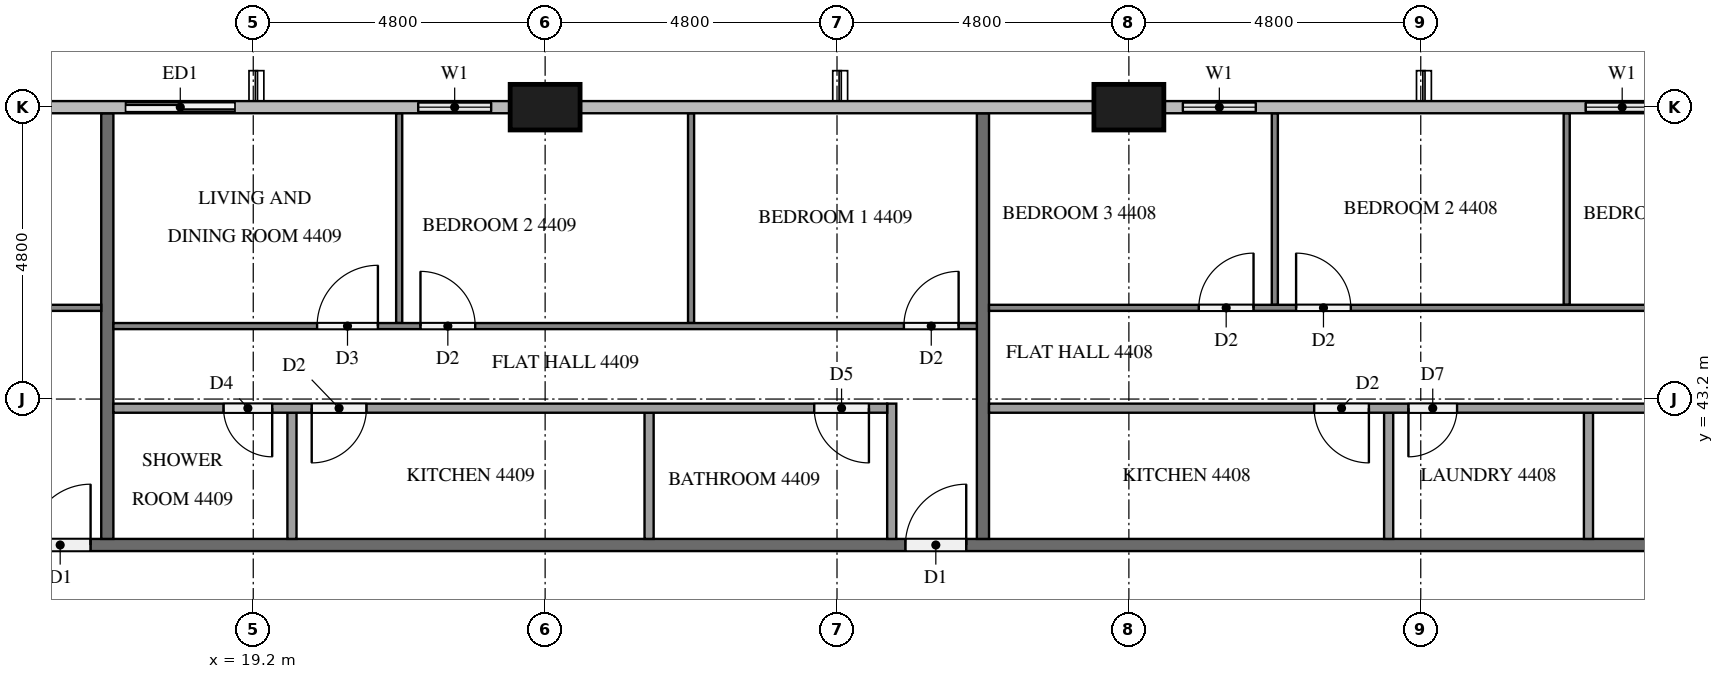
"""IFC4 building model, lengths in metres.
Left out: names, types, materials, properties, quantities, classifications, styles, units other than length and angle.
Written with IfcOpenShell. Run it as: python <this file> out.ifc"""

import sys

from ifc_helpers import new_model, si_unit, direction, frame, frame_2d, origin, origin_2d, place, context, subcontext, project, spatial, rectangle, extrude, element, fill, save


model = new_model("IFC4")
c1 = context("Model", 3, precision=1e-05, world=origin(), true_north=direction((0.0, 1.0)))
c2 = subcontext(c1, "Body", "Model", "MODEL_VIEW")
j1 = project(units=[si_unit("LENGTHUNIT", "METRE"), si_unit("PLANEANGLEUNIT", "RADIAN")], contexts=[c1])
p1 = place(None, origin())
s1 = spatial("IfcSite", under=j1, at=p1, CompositionType="ELEMENT")
p2 = place(p1, origin())
s2 = spatial("IfcBuilding", under=s1, at=p2, CompositionType="ELEMENT")
p3 = place(p2, frame((0.0, 0.0, 170.0)))
s3 = spatial("IfcBuildingStorey", under=s2, at=p3, CompositionType="ELEMENT", Elevation=170.0)
for number, where, z_axis, x_axis in (
    (1, (33.6, 48.0, 0.0), (0.0, 0.0, 1.0), (1.0, 0.0, 0.0)),
    (2, (24.0, 48.0, 0.0), (0.0, 0.0, 1.0), (1.0, 0.0, 0.0)),
):
    element("IfcColumn", number, at=place(p3, frame(where, z_axis=z_axis, x_axis=x_axis)), inside=s3, PredefinedType="COLUMN", context=c2, shape_type="SweptSolid", body=[
        extrude(rectangle(XDim=1.15, YDim=0.75, at=origin_2d()), origin(), (0.0, 0.0, 1.0), 3.1),
    ])
p4 = place(p3, frame((42.625, 48.0, 0.0), z_axis=(0.0, 0.0, 1.0), x_axis=(-1.0, 0.0, 0.0)))
e3 = element("IfcWall", 3, at=p4, inside=s3, PredefinedType="SOLIDWALL", context=c2, shape_type="SweptSolid", body=[
    extrude(rectangle(XDim=1.825, YDim=0.15, at=frame_2d((0.913, 0.0))), origin(), (0.0, 0.0, 1.0), 3.1),
])
p5 = place(p4, frame((0.312, 0.0, 0.9)))
e4 = element("IfcOpeningElement", 4, at=p5, cuts=e3, PredefinedType="OPENING", context=c2, shape_type="SweptSolid", body=[
    extrude(rectangle(XDim=1.2, YDim=1.4, at=frame_2d((0.6, 0.7))), frame((0.0, 0.085, 0.0), z_axis=(0.0, -1.0, 0.0), x_axis=(1.0, 0.0, 0.0)), (0.0, 0.0, 1.0), 0.17),
])
p6 = place(p3, frame((36.0, 48.0, 0.0), z_axis=(0.0, 0.0, 1.0), x_axis=(-1.0, 0.0, 0.0)))
e5 = element("IfcWall", 5, at=p6, inside=s3, PredefinedType="SOLIDWALL", context=c2, shape_type="SweptSolid", body=[
    extrude(rectangle(XDim=1.825, YDim=0.15, at=frame_2d((0.913, 0.0))), origin(), (0.0, 0.0, 1.0), 3.1),
])
p7 = place(p6, frame((0.312, 0.0, 0.9)))
e6 = element("IfcOpeningElement", 6, at=p7, cuts=e5, PredefinedType="OPENING", context=c2, shape_type="SweptSolid", body=[
    extrude(rectangle(XDim=1.2, YDim=1.4, at=frame_2d((0.6, 0.7))), frame((0.0, 0.085, 0.0), z_axis=(0.0, -1.0, 0.0), x_axis=(1.0, 0.0, 0.0)), (0.0, 0.0, 1.0), 0.17),
])
p8 = place(p3, frame((23.425, 48.0, 0.0), z_axis=(0.0, 0.0, 1.0), x_axis=(-1.0, 0.0, 0.0)))
e7 = element("IfcWall", 7, at=p8, inside=s3, PredefinedType="SOLIDWALL", context=c2, shape_type="SweptSolid", body=[
    extrude(rectangle(XDim=1.825, YDim=0.15, at=frame_2d((0.913, 0.0))), origin(), (0.0, 0.0, 1.0), 3.1),
])
p9 = place(p8, frame((0.312, 0.0, 0.9)))
e8 = element("IfcOpeningElement", 8, at=p9, cuts=e7, PredefinedType="OPENING", context=c2, shape_type="SweptSolid", body=[
    extrude(rectangle(XDim=1.2, YDim=1.4, at=frame_2d((0.6, 0.7))), frame((0.0, 0.085, 0.0), z_axis=(0.0, -1.0, 0.0), x_axis=(1.0, 0.0, 0.0)), (0.0, 0.0, 1.0), 0.17),
])
p10 = place(p3, frame((19.2, 48.0, 0.0), z_axis=(0.0, 0.0, 1.0), x_axis=(-1.0, 0.0, 0.0)))
e9 = element("IfcWall", 9, at=p10, inside=s3, PredefinedType="SOLIDWALL", context=c2, shape_type="SweptSolid", body=[
    extrude(rectangle(XDim=2.4, YDim=0.15, at=frame_2d((1.2, 0.0))), origin(), (0.0, 0.0, 1.0), 3.1),
])
p11 = place(p10, frame((0.3, 0.0, 0.0)))
e10 = element("IfcOpeningElement", 10, at=p11, cuts=e9, PredefinedType="OPENING", context=c2, shape_type="SweptSolid", body=[
    extrude(rectangle(XDim=1.8, YDim=2.4, at=frame_2d((0.9, 1.2))), frame((0.0, 0.085, 0.0), z_axis=(0.0, -1.0, 0.0), x_axis=(1.0, 0.0, 0.0)), (0.0, 0.0, 1.0), 0.17),
])
p12 = place(p3, frame((11.9, 40.8, 0.0), z_axis=(0.0, 0.0, 1.0), x_axis=(1.0, 0.0, 0.0)))
e11 = element("IfcWall", 11, at=p12, inside=s3, PredefinedType="PARTITIONING", context=c2, shape_type="SweptSolid", body=[
    extrude(rectangle(XDim=38.6, YDim=0.2, at=frame_2d((19.3, 0.0))), origin(), (0.0, 0.0, 1.0), 3.1),
])
p13 = place(p12, frame((37.175, 0.0, 0.0)))
e12 = element("IfcOpeningElement", 12, at=p13, cuts=e11, PredefinedType="OPENING", context=c2, shape_type="SweptSolid", body=[
    extrude(rectangle(XDim=1.1, YDim=2.1, at=frame_2d((0.55, 1.05))), frame((0.0, 0.11, 0.0), z_axis=(0.0, -1.0, 0.0), x_axis=(1.0, 0.0, 0.0)), (0.0, 0.0, 1.0), 0.22),
])
p14 = place(p12, frame((18.025, 0.0, 0.0)))
e13 = element("IfcOpeningElement", 13, at=p14, cuts=e11, PredefinedType="OPENING", context=c2, shape_type="SweptSolid", body=[
    extrude(rectangle(XDim=1.0, YDim=2.1, at=frame_2d((0.5, 1.05))), frame((0.0, 0.11, 0.0), z_axis=(0.0, -1.0, 0.0), x_axis=(1.0, 0.0, 0.0)), (0.0, 0.0, 1.0), 0.22),
])
p15 = place(p12, frame((3.625, 0.0, 0.0)))
e14 = element("IfcOpeningElement", 14, at=p15, cuts=e11, PredefinedType="OPENING", context=c2, shape_type="SweptSolid", body=[
    extrude(rectangle(XDim=1.0, YDim=2.1, at=frame_2d((0.5, 1.05))), frame((0.0, 0.11, 0.0), z_axis=(0.0, -1.0, 0.0), x_axis=(1.0, 0.0, 0.0)), (0.0, 0.0, 1.0), 0.22),
])
for number, where, z_axis, x_axis in (
    (15, (31.2, 47.9, 0.0), (0.0, 0.0, 1.0), (0.0, -1.0, 0.0)),
    (16, (16.8, 47.9, 0.0), (0.0, 0.0, 1.0), (0.0, -1.0, 0.0)),
):
    element("IfcWall", number, at=place(p3, frame(where, z_axis=z_axis, x_axis=x_axis)), inside=s3, PredefinedType="PARTITIONING", context=c2, shape_type="SweptSolid", body=[
        extrude(rectangle(XDim=7.0, YDim=0.2, at=frame_2d((3.5, 0.0))), origin(), (0.0, 0.0, 1.0), 3.1),
    ])
for number, where, z_axis, x_axis in (
    (17, (40.8, 44.75, 0.0), (0.0, 0.0, 1.0), (0.0, 1.0, 0.0)),
    (18, (36.0, 44.75, 0.0), (0.0, 0.0, 1.0), (0.0, 1.0, 0.0)),
):
    element("IfcWall", number, at=place(p3, frame(where, z_axis=z_axis, x_axis=x_axis)), inside=s3, PredefinedType="PARTITIONING", context=c2, shape_type="SweptSolid", body=[
        extrude(rectangle(XDim=3.15, YDim=0.1, at=frame_2d((1.575, 0.0))), origin(), (0.0, 0.0, 1.0), 3.1),
    ])
p16 = place(p3, frame((31.3, 44.7, 0.0), z_axis=(0.0, 0.0, 1.0), x_axis=(1.0, 0.0, 0.0)))
e19 = element("IfcWall", 19, at=p16, inside=s3, PredefinedType="PARTITIONING", context=c2, shape_type="SweptSolid", body=[
    extrude(rectangle(XDim=19.0, YDim=0.1, at=frame_2d((9.5, 0.0))), origin(), (0.0, 0.0, 1.0), 3.1),
])
p17 = place(p16, frame((14.65, 0.0, 0.0)))
e20 = element("IfcOpeningElement", 20, at=p17, cuts=e19, PredefinedType="OPENING", context=c2, shape_type="SweptSolid", body=[
    extrude(rectangle(XDim=1.0, YDim=2.1, at=frame_2d((0.5, 1.05))), frame((0.0, 0.06, 0.0), z_axis=(0.0, -1.0, 0.0), x_axis=(1.0, 0.0, 0.0)), (0.0, 0.0, 1.0), 0.12),
])
p18 = place(p16, frame((13.05, 0.0, 0.0)))
e21 = element("IfcOpeningElement", 21, at=p18, cuts=e19, PredefinedType="OPENING", context=c2, shape_type="SweptSolid", body=[
    extrude(rectangle(XDim=0.9, YDim=2.1, at=frame_2d((0.45, 1.05))), frame((0.0, 0.06, 0.0), z_axis=(0.0, -1.0, 0.0), x_axis=(1.0, 0.0, 0.0)), (0.0, 0.0, 1.0), 0.12),
])
p19 = place(p16, frame((5.05, 0.0, 0.0)))
e22 = element("IfcOpeningElement", 22, at=p19, cuts=e19, PredefinedType="OPENING", context=c2, shape_type="SweptSolid", body=[
    extrude(rectangle(XDim=0.9, YDim=2.1, at=frame_2d((0.45, 1.05))), frame((0.0, 0.06, 0.0), z_axis=(0.0, -1.0, 0.0), x_axis=(1.0, 0.0, 0.0)), (0.0, 0.0, 1.0), 0.12),
])
p20 = place(p16, frame((3.45, 0.0, 0.0)))
e23 = element("IfcOpeningElement", 23, at=p20, cuts=e19, PredefinedType="OPENING", context=c2, shape_type="SweptSolid", body=[
    extrude(rectangle(XDim=0.9, YDim=2.1, at=frame_2d((0.45, 1.05))), frame((0.0, 0.06, 0.0), z_axis=(0.0, -1.0, 0.0), x_axis=(1.0, 0.0, 0.0)), (0.0, 0.0, 1.0), 0.12),
])
for number, where, z_axis, x_axis in (
    (24, (41.158, 40.9, 0.0), (0.0, 0.0, 1.0), (0.0, 1.0, 0.0)),
    (25, (37.872, 40.9, 0.0), (0.0, 0.0, 1.0), (0.0, 1.0, 0.0)),
):
    element("IfcWall", number, at=place(p3, frame(where, z_axis=z_axis, x_axis=x_axis)), inside=s3, PredefinedType="PARTITIONING", context=c2, shape_type="SweptSolid", body=[
        extrude(rectangle(XDim=2.075, YDim=0.15, at=frame_2d((1.038, 0.0))), origin(), (0.0, 0.0, 1.0), 3.1),
    ])
p21 = place(p3, frame((48.825, 43.05, 0.0), z_axis=(0.0, 0.0, 1.0), x_axis=(-1.0, 0.0, 0.0)))
e26 = element("IfcWall", 26, at=p21, inside=s3, PredefinedType="PARTITIONING", context=c2, shape_type="SweptSolid", body=[
    extrude(rectangle(XDim=17.525, YDim=0.15, at=frame_2d((8.762, 0.0))), origin(), (0.0, 0.0, 1.0), 3.1),
])
p22 = place(p21, frame((2.161, 0.0, 0.0)))
e27 = element("IfcOpeningElement", 27, at=p22, cuts=e26, PredefinedType="OPENING", context=c2, shape_type="SweptSolid", body=[
    extrude(rectangle(XDim=0.8, YDim=2.1, at=frame_2d((0.4, 1.05))), frame((0.0, 0.085, 0.0), z_axis=(0.0, -1.0, 0.0), x_axis=(1.0, 0.0, 0.0)), (0.0, 0.0, 1.0), 0.17),
])
p23 = place(p21, frame((3.611, 0.0, 0.0)))
e28 = element("IfcOpeningElement", 28, at=p23, cuts=e26, PredefinedType="OPENING", context=c2, shape_type="SweptSolid", body=[
    extrude(rectangle(XDim=0.9, YDim=2.1, at=frame_2d((0.45, 1.05))), frame((0.0, 0.085, 0.0), z_axis=(0.0, -1.0, 0.0), x_axis=(1.0, 0.0, 0.0)), (0.0, 0.0, 1.0), 0.17),
])
p24 = place(p21, frame((9.828, 0.0, 0.0)))
e29 = element("IfcOpeningElement", 29, at=p24, cuts=e26, PredefinedType="OPENING", context=c2, shape_type="SweptSolid", body=[
    extrude(rectangle(XDim=0.8, YDim=2.1, at=frame_2d((0.4, 1.05))), frame((0.0, 0.085, 0.0), z_axis=(0.0, -1.0, 0.0), x_axis=(1.0, 0.0, 0.0)), (0.0, 0.0, 1.0), 0.17),
])
p25 = place(p21, frame((11.278, 0.0, 0.0)))
e30 = element("IfcOpeningElement", 30, at=p25, cuts=e26, PredefinedType="OPENING", context=c2, shape_type="SweptSolid", body=[
    extrude(rectangle(XDim=0.9, YDim=2.1, at=frame_2d((0.45, 1.05))), frame((0.0, 0.085, 0.0), z_axis=(0.0, -1.0, 0.0), x_axis=(1.0, 0.0, 0.0)), (0.0, 0.0, 1.0), 0.17),
])
for number, where, z_axis, x_axis in (
    (31, (26.4, 44.45, 0.0), (0.0, 0.0, 1.0), (0.0, 1.0, 0.0)),
    (32, (21.6, 44.45, 0.0), (0.0, 0.0, 1.0), (0.0, 1.0, 0.0)),
):
    element("IfcWall", number, at=place(p3, frame(where, z_axis=z_axis, x_axis=x_axis)), inside=s3, PredefinedType="PARTITIONING", context=c2, shape_type="SweptSolid", body=[
        extrude(rectangle(XDim=3.45, YDim=0.1, at=frame_2d((1.725, 0.0))), origin(), (0.0, 0.0, 1.0), 3.1),
    ])
p26 = place(p3, frame((16.9, 44.4, 0.0), z_axis=(0.0, 0.0, 1.0), x_axis=(1.0, 0.0, 0.0)))
e33 = element("IfcWall", 33, at=p26, inside=s3, PredefinedType="PARTITIONING", context=c2, shape_type="SweptSolid", body=[
    extrude(rectangle(XDim=14.2, YDim=0.1, at=frame_2d((7.1, 0.0))), origin(), (0.0, 0.0, 1.0), 3.1),
])
p27 = place(p26, frame((13.0, 0.0, 0.0)))
e34 = element("IfcOpeningElement", 34, at=p27, cuts=e33, PredefinedType="OPENING", context=c2, shape_type="SweptSolid", body=[
    extrude(rectangle(XDim=0.9, YDim=2.1, at=frame_2d((0.45, 1.05))), frame((0.0, 0.06, 0.0), z_axis=(0.0, -1.0, 0.0), x_axis=(1.0, 0.0, 0.0)), (0.0, 0.0, 1.0), 0.12),
])
p28 = place(p26, frame((5.05, 0.0, 0.0)))
e35 = element("IfcOpeningElement", 35, at=p28, cuts=e33, PredefinedType="OPENING", context=c2, shape_type="SweptSolid", body=[
    extrude(rectangle(XDim=0.9, YDim=2.1, at=frame_2d((0.45, 1.05))), frame((0.0, 0.06, 0.0), z_axis=(0.0, -1.0, 0.0), x_axis=(1.0, 0.0, 0.0)), (0.0, 0.0, 1.0), 0.12),
])
p29 = place(p26, frame((3.35, 0.0, 0.0)))
e36 = element("IfcOpeningElement", 36, at=p29, cuts=e33, PredefinedType="OPENING", context=c2, shape_type="SweptSolid", body=[
    extrude(rectangle(XDim=1.0, YDim=2.1, at=frame_2d((0.5, 1.05))), frame((0.0, 0.06, 0.0), z_axis=(0.0, -1.0, 0.0), x_axis=(1.0, 0.0, 0.0)), (0.0, 0.0, 1.0), 0.12),
])
for number, where, z_axis, x_axis in (
    (37, (25.71, 40.9, 0.0), (0.0, 0.0, 1.0), (0.0, 1.0, 0.0)),
    (38, (19.836, 40.9, 0.0), (0.0, 0.0, 1.0), (0.0, 1.0, 0.0)),
):
    element("IfcWall", number, at=place(p3, frame(where, z_axis=z_axis, x_axis=x_axis)), inside=s3, PredefinedType="PARTITIONING", context=c2, shape_type="SweptSolid", body=[
        extrude(rectangle(XDim=2.075, YDim=0.15, at=frame_2d((1.038, 0.0))), origin(), (0.0, 0.0, 1.0), 3.1),
    ])
p30 = place(p3, frame((29.7, 40.9, 0.0), z_axis=(0.0, 0.0, 1.0), x_axis=(0.0, 1.0, 0.0)))
e39 = element("IfcWall", 39, at=p30, inside=s3, PredefinedType="PARTITIONING", context=c2, shape_type="SweptSolid", body=[
    extrude(rectangle(XDim=2.225, YDim=0.15, at=frame_2d((1.113, 0.0))), origin(), (0.0, 0.0, 1.0), 3.1),
])
p31 = place(p3, frame((29.625, 43.05, 0.0), z_axis=(0.0, 0.0, 1.0), x_axis=(-1.0, 0.0, 0.0)))
e40 = element("IfcWall", 40, at=p31, inside=s3, PredefinedType="PARTITIONING", context=c2, shape_type="SweptSolid", body=[
    extrude(rectangle(XDim=12.725, YDim=0.15, at=frame_2d((6.363, 0.0))), origin(), (0.0, 0.0, 1.0), 3.1),
])
p32 = place(p31, frame((0.3, 0.0, 0.0)))
e41 = element("IfcOpeningElement", 41, at=p32, cuts=e40, PredefinedType="OPENING", context=c2, shape_type="SweptSolid", body=[
    extrude(rectangle(XDim=0.9, YDim=2.1, at=frame_2d((0.45, 1.05))), frame((0.0, 0.085, 0.0), z_axis=(0.0, -1.0, 0.0), x_axis=(1.0, 0.0, 0.0)), (0.0, 0.0, 1.0), 0.17),
])
p33 = place(p31, frame((8.563, 0.0, 0.0)))
e42 = element("IfcOpeningElement", 42, at=p33, cuts=e40, PredefinedType="OPENING", context=c2, shape_type="SweptSolid", body=[
    extrude(rectangle(XDim=0.9, YDim=2.1, at=frame_2d((0.45, 1.05))), frame((0.0, 0.085, 0.0), z_axis=(0.0, -1.0, 0.0), x_axis=(1.0, 0.0, 0.0)), (0.0, 0.0, 1.0), 0.17),
])
p34 = place(p31, frame((10.114, 0.0, 0.0)))
e43 = element("IfcOpeningElement", 43, at=p34, cuts=e40, PredefinedType="OPENING", context=c2, shape_type="SweptSolid", body=[
    extrude(rectangle(XDim=0.8, YDim=2.1, at=frame_2d((0.4, 1.05))), frame((0.0, 0.085, 0.0), z_axis=(0.0, -1.0, 0.0), x_axis=(1.0, 0.0, 0.0)), (0.0, 0.0, 1.0), 0.17),
])
p35 = place(p3, frame((0.502, 44.7, 0.0), z_axis=(0.0, 0.0, 1.0), x_axis=(1.0, 0.0, 0.0)))
e44 = element("IfcWall", 44, at=p35, inside=s3, PredefinedType="PARTITIONING", context=c2, shape_type="SweptSolid", body=[
    extrude(rectangle(XDim=16.198, YDim=0.1, at=frame_2d((8.099, 0.0))), origin(), (0.0, 0.0, 1.0), 3.1),
])
p36 = place(p35, frame((11.848, 0.0, 0.0)))
e45 = element("IfcOpeningElement", 45, at=p36, cuts=e44, PredefinedType="OPENING", context=c2, shape_type="SweptSolid", body=[
    extrude(rectangle(XDim=0.9, YDim=2.1, at=frame_2d((0.45, 1.05))), frame((0.0, 0.06, 0.0), z_axis=(0.0, -1.0, 0.0), x_axis=(1.0, 0.0, 0.0)), (0.0, 0.0, 1.0), 0.12),
])
p37 = place(p35, frame((10.148, 0.0, 0.0)))
e46 = element("IfcOpeningElement", 46, at=p37, cuts=e44, PredefinedType="OPENING", context=c2, shape_type="SweptSolid", body=[
    extrude(rectangle(XDim=1.0, YDim=2.1, at=frame_2d((0.5, 1.05))), frame((0.0, 0.06, 0.0), z_axis=(0.0, -1.0, 0.0), x_axis=(1.0, 0.0, 0.0)), (0.0, 0.0, 1.0), 0.12),
])
p38 = place(p35, frame((0.3, 0.0, 0.0)))
e47 = element("IfcOpeningElement", 47, at=p38, cuts=e44, PredefinedType="OPENING", context=c2, shape_type="SweptSolid", body=[
    extrude(rectangle(XDim=0.9, YDim=2.1, at=frame_2d((0.45, 1.05))), frame((0.0, 0.06, 0.0), z_axis=(0.0, -1.0, 0.0), x_axis=(1.0, 0.0, 0.0)), (0.0, 0.0, 1.0), 0.12),
])
p39 = place(p5, origin())
e48 = element("IfcWindow", 48, at=p39, inside=s3, PartitioningType="SINGLE_PANEL", PredefinedType="WINDOW", context=c2, shape_type="SweptSolid", body=[
    extrude(rectangle(XDim=1.2, YDim=1.4, at=frame_2d((0.6, 0.7))), frame((0.0, 0.03, 0.0), z_axis=(0.0, -1.0, 0.0), x_axis=(1.0, 0.0, 0.0)), (0.0, 0.0, 1.0), 0.06),
])
fill(e4, e48)
p40 = place(p7, origin())
e49 = element("IfcWindow", 49, at=p40, inside=s3, PartitioningType="SINGLE_PANEL", PredefinedType="WINDOW", context=c2, shape_type="SweptSolid", body=[
    extrude(rectangle(XDim=1.2, YDim=1.4, at=frame_2d((0.6, 0.7))), frame((0.0, 0.03, 0.0), z_axis=(0.0, -1.0, 0.0), x_axis=(1.0, 0.0, 0.0)), (0.0, 0.0, 1.0), 0.06),
])
fill(e6, e49)
p41 = place(p9, origin())
e50 = element("IfcWindow", 50, at=p41, inside=s3, PartitioningType="SINGLE_PANEL", PredefinedType="WINDOW", context=c2, shape_type="SweptSolid", body=[
    extrude(rectangle(XDim=1.2, YDim=1.4, at=frame_2d((0.6, 0.7))), frame((0.0, 0.03, 0.0), z_axis=(0.0, -1.0, 0.0), x_axis=(1.0, 0.0, 0.0)), (0.0, 0.0, 1.0), 0.06),
])
fill(e8, e50)
p42 = place(p11, origin())
e51 = element("IfcDoor", 51, at=p42, inside=s3, OperationType="SLIDING_TO_LEFT", PredefinedType="DOOR", context=c2, shape_type="SweptSolid", body=[
    extrude(rectangle(XDim=1.8, YDim=2.4, at=frame_2d((0.9, 1.2))), frame((0.0, 0.025, 0.0), z_axis=(0.0, -1.0, 0.0), x_axis=(1.0, 0.0, 0.0)), (0.0, 0.0, 1.0), 0.05),
])
fill(e10, e51)
p43 = place(p14, origin())
e52 = element("IfcDoor", 52, at=p43, inside=s3, OperationType="SINGLE_SWING_RIGHT", PredefinedType="DOOR", context=c2, shape_type="SweptSolid", body=[
    extrude(rectangle(XDim=1.0, YDim=2.1, at=frame_2d((0.5, 1.05))), frame((0.0, 0.025, 0.0), z_axis=(0.0, -1.0, 0.0), x_axis=(1.0, 0.0, 0.0)), (0.0, 0.0, 1.0), 0.05),
])
fill(e13, e52)
p44 = place(p15, origin())
e53 = element("IfcDoor", 53, at=p44, inside=s3, OperationType="SINGLE_SWING_RIGHT", PredefinedType="DOOR", context=c2, shape_type="SweptSolid", body=[
    extrude(rectangle(XDim=1.0, YDim=2.1, at=frame_2d((0.5, 1.05))), frame((0.0, 0.025, 0.0), z_axis=(0.0, -1.0, 0.0), x_axis=(1.0, 0.0, 0.0)), (0.0, 0.0, 1.0), 0.05),
])
fill(e14, e53)
p45 = place(p19, origin())
e54 = element("IfcDoor", 54, at=p45, inside=s3, OperationType="SINGLE_SWING_LEFT", PredefinedType="DOOR", context=c2, shape_type="SweptSolid", body=[
    extrude(rectangle(XDim=0.9, YDim=2.1, at=frame_2d((0.45, 1.05))), frame((0.0, 0.025, 0.0), z_axis=(0.0, -1.0, 0.0), x_axis=(1.0, 0.0, 0.0)), (0.0, 0.0, 1.0), 0.05),
])
fill(e22, e54)
p46 = place(p20, origin())
e55 = element("IfcDoor", 55, at=p46, inside=s3, OperationType="SINGLE_SWING_RIGHT", PredefinedType="DOOR", context=c2, shape_type="SweptSolid", body=[
    extrude(rectangle(XDim=0.9, YDim=2.1, at=frame_2d((0.45, 1.05))), frame((0.0, 0.025, 0.0), z_axis=(0.0, -1.0, 0.0), x_axis=(1.0, 0.0, 0.0)), (0.0, 0.0, 1.0), 0.05),
])
fill(e23, e55)
p47 = place(p24, origin())
e56 = element("IfcDoor", 56, at=p47, inside=s3, OperationType="SINGLE_SWING_RIGHT", PredefinedType="DOOR", context=c2, shape_type="SweptSolid", body=[
    extrude(rectangle(XDim=0.8, YDim=2.1, at=frame_2d((0.4, 1.05))), frame((0.0, 0.025, 0.0), z_axis=(0.0, -1.0, 0.0), x_axis=(1.0, 0.0, 0.0)), (0.0, 0.0, 1.0), 0.05),
])
fill(e29, e56)
p48 = place(p25, origin())
e57 = element("IfcDoor", 57, at=p48, inside=s3, OperationType="SINGLE_SWING_LEFT", PredefinedType="DOOR", context=c2, shape_type="SweptSolid", body=[
    extrude(rectangle(XDim=0.9, YDim=2.1, at=frame_2d((0.45, 1.05))), frame((0.0, 0.025, 0.0), z_axis=(0.0, -1.0, 0.0), x_axis=(1.0, 0.0, 0.0)), (0.0, 0.0, 1.0), 0.05),
])
fill(e30, e57)
p49 = place(p27, origin())
e58 = element("IfcDoor", 58, at=p49, inside=s3, OperationType="SINGLE_SWING_RIGHT", PredefinedType="DOOR", context=c2, shape_type="SweptSolid", body=[
    extrude(rectangle(XDim=0.9, YDim=2.1, at=frame_2d((0.45, 1.05))), frame((0.0, 0.025, 0.0), z_axis=(0.0, -1.0, 0.0), x_axis=(1.0, 0.0, 0.0)), (0.0, 0.0, 1.0), 0.05),
])
fill(e34, e58)
p50 = place(p28, origin())
e59 = element("IfcDoor", 59, at=p50, inside=s3, OperationType="SINGLE_SWING_LEFT", PredefinedType="DOOR", context=c2, shape_type="SweptSolid", body=[
    extrude(rectangle(XDim=0.9, YDim=2.1, at=frame_2d((0.45, 1.05))), frame((0.0, 0.025, 0.0), z_axis=(0.0, -1.0, 0.0), x_axis=(1.0, 0.0, 0.0)), (0.0, 0.0, 1.0), 0.05),
])
fill(e35, e59)
p51 = place(p29, origin())
e60 = element("IfcDoor", 60, at=p51, inside=s3, OperationType="SINGLE_SWING_RIGHT", PredefinedType="DOOR", context=c2, shape_type="SweptSolid", body=[
    extrude(rectangle(XDim=1.0, YDim=2.1, at=frame_2d((0.5, 1.05))), frame((0.0, 0.025, 0.0), z_axis=(0.0, -1.0, 0.0), x_axis=(1.0, 0.0, 0.0)), (0.0, 0.0, 1.0), 0.05),
])
fill(e36, e60)
p52 = place(p32, origin())
e61 = element("IfcDoor", 61, at=p52, inside=s3, OperationType="SINGLE_SWING_LEFT", PredefinedType="DOOR", context=c2, shape_type="SweptSolid", body=[
    extrude(rectangle(XDim=0.9, YDim=2.1, at=frame_2d((0.45, 1.05))), frame((0.0, 0.025, 0.0), z_axis=(0.0, -1.0, 0.0), x_axis=(1.0, 0.0, 0.0)), (0.0, 0.0, 1.0), 0.05),
])
fill(e41, e61)
p53 = place(p33, origin())
e62 = element("IfcDoor", 62, at=p53, inside=s3, OperationType="SINGLE_SWING_RIGHT", PredefinedType="DOOR", context=c2, shape_type="SweptSolid", body=[
    extrude(rectangle(XDim=0.9, YDim=2.1, at=frame_2d((0.45, 1.05))), frame((0.0, 0.025, 0.0), z_axis=(0.0, -1.0, 0.0), x_axis=(1.0, 0.0, 0.0)), (0.0, 0.0, 1.0), 0.05),
])
fill(e42, e62)
p54 = place(p34, origin())
e63 = element("IfcDoor", 63, at=p54, inside=s3, OperationType="SINGLE_SWING_LEFT", PredefinedType="DOOR", context=c2, shape_type="SweptSolid", body=[
    extrude(rectangle(XDim=0.8, YDim=2.1, at=frame_2d((0.4, 1.05))), frame((0.0, 0.025, 0.0), z_axis=(0.0, -1.0, 0.0), x_axis=(1.0, 0.0, 0.0)), (0.0, 0.0, 1.0), 0.05),
])
fill(e43, e63)
save(model, sys.argv[1])
